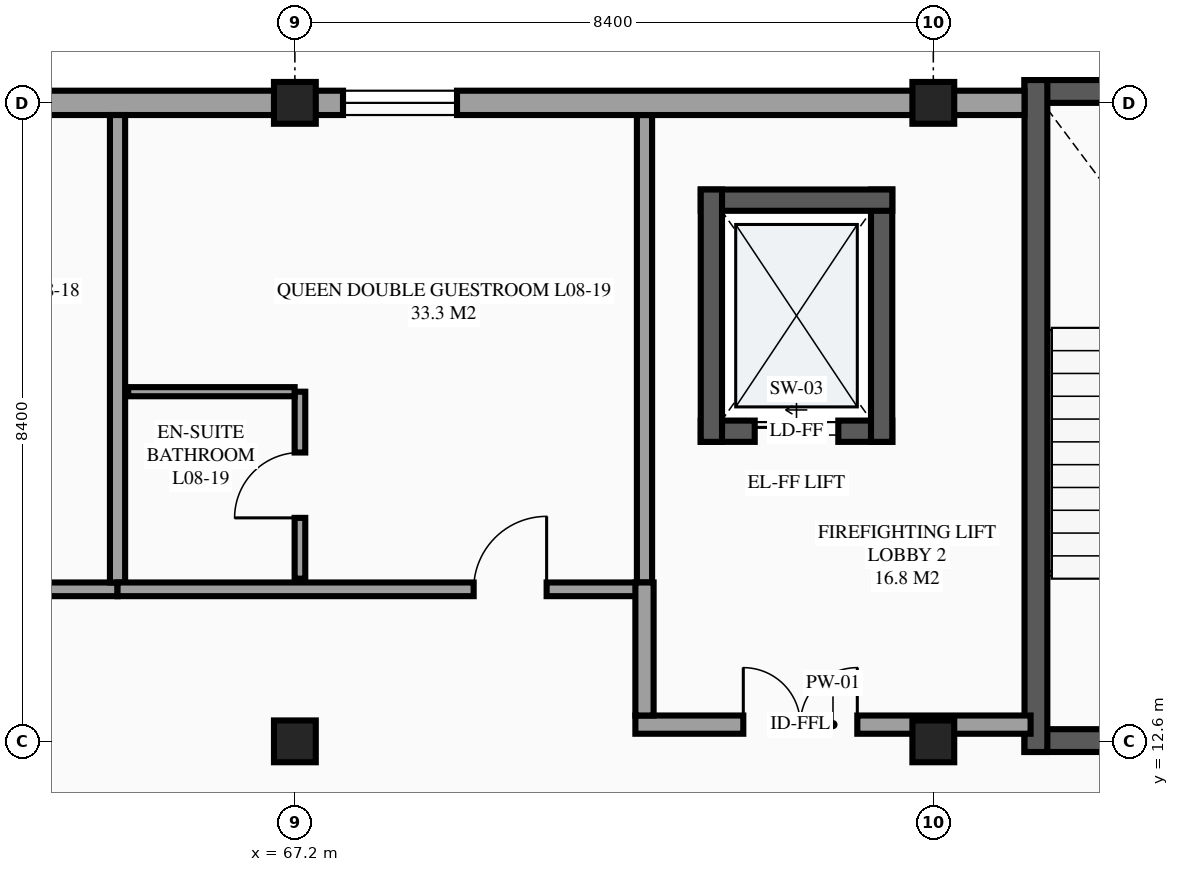
"""IFC4 building model, lengths in metres.
Left out: names, types, materials, properties, quantities, classifications, styles, units other than length and angle.
Written with IfcOpenShell. Run it as: python <this file> out.ifc"""

import sys

from ifc_helpers import new_model, si_unit, direction, frame, frame_2d, origin, origin_2d, place, context, subcontext, project, spatial, rectangle, extrude, element, fill, save


model = new_model("IFC4")
c1 = context("Model", 3, precision=1e-05, world=origin(), true_north=direction((0.0, 1.0)))
c2 = subcontext(c1, "Body", "Model", "MODEL_VIEW")
j1 = project(units=[si_unit("LENGTHUNIT", "METRE"), si_unit("PLANEANGLEUNIT", "RADIAN")], contexts=[c1])
p1 = place(None, origin())
s1 = spatial("IfcSite", under=j1, at=p1, CompositionType="ELEMENT")
p2 = place(p1, origin())
s2 = spatial("IfcBuilding", under=s1, at=p2, CompositionType="ELEMENT")
p3 = place(p2, frame((0.0, 0.0, 32.7)))
s3 = spatial("IfcBuildingStorey", under=s2, at=p3, CompositionType="ELEMENT", Elevation=32.7)
for number, where, z_axis, x_axis in (
    (1, (67.2, 12.6, 0.0), (0.0, 0.0, 1.0), (1.0, 0.0, 0.0)),
    (2, (67.2, 21.0, 0.0), (0.0, 0.0, 1.0), (1.0, 0.0, 0.0)),
    (3, (75.6, 12.6, 0.0), (0.0, 0.0, 1.0), (1.0, 0.0, 0.0)),
    (4, (75.6, 21.0, 0.0), (0.0, 0.0, 1.0), (1.0, 0.0, 0.0)),
):
    element("IfcColumn", number, at=place(p3, frame(where, z_axis=z_axis, x_axis=x_axis)), inside=s3, PredefinedType="COLUMN", context=c2, shape_type="SweptSolid", body=[
        extrude(rectangle(XDim=0.55, YDim=0.55, at=origin_2d()), origin(), (0.0, 0.0, 1.0), 3.6),
    ])
p4 = place(p3, frame((67.2, 21.0, 0.0), z_axis=(0.0, 0.0, 1.0), x_axis=(-1.0, 0.0, 0.0)))
e5 = element("IfcWall", 5, at=p4, inside=s3, PredefinedType="STANDARD", context=c2, shape_type="SweptSolid", body=[
    extrude(rectangle(XDim=8.4, YDim=0.32, at=frame_2d((4.2, 0.0))), origin(), (0.0, 0.0, 1.0), 3.075),
])
p5 = place(p4, frame((5.05, 0.0, 0.85)))
e6 = element("IfcOpeningElement", 6, at=p5, cuts=e5, PredefinedType="OPENING", context=c2, shape_type="SweptSolid", body=[
    extrude(rectangle(XDim=1.5, YDim=1.5, at=frame_2d((0.75, 0.75))), frame((0.0, 0.17, 0.0), z_axis=(0.0, -1.0, 0.0), x_axis=(1.0, 0.0, 0.0)), (0.0, 0.0, 1.0), 0.34),
])
p6 = place(p3, frame((72.54, 16.68, 0.0), z_axis=(0.0, 0.0, 1.0), x_axis=(1.0, 0.0, 0.0)))
e7 = element("IfcWall", 7, at=p6, inside=s3, PredefinedType="SHEAR", context=c2, shape_type="SweptSolid", body=[
    extrude(rectangle(XDim=2.52, YDim=0.28, at=frame_2d((1.26, 0.0))), origin(), (0.0, 0.0, 1.0), 3.6),
])
p7 = place(p6, frame((0.71, 0.0, 0.0)))
e8 = element("IfcOpeningElement", 8, at=p7, cuts=e7, PredefinedType="OPENING", context=c2, shape_type="SweptSolid", body=[
    extrude(rectangle(XDim=1.1, YDim=2.2, at=frame_2d((0.55, 1.1))), frame((0.0, 0.15, 0.0), z_axis=(0.0, -1.0, 0.0), x_axis=(1.0, 0.0, 0.0)), (0.0, 0.0, 1.0), 0.3),
])
p8 = place(p3, frame((74.92, 16.54, 0.0), z_axis=(0.0, 0.0, 1.0), x_axis=(0.0, 1.0, 0.0)))
e9 = element("IfcWall", 9, at=p8, inside=s3, PredefinedType="SHEAR", context=c2, shape_type="SweptSolid", body=[
    extrude(rectangle(XDim=3.32, YDim=0.28, at=frame_2d((1.66, 0.0))), origin(), (0.0, 0.0, 1.0), 3.6),
])
p9 = place(p3, frame((75.06, 19.72, 0.0), z_axis=(0.0, 0.0, 1.0), x_axis=(-1.0, 0.0, 0.0)))
e10 = element("IfcWall", 10, at=p9, inside=s3, PredefinedType="SHEAR", context=c2, shape_type="SweptSolid", body=[
    extrude(rectangle(XDim=2.52, YDim=0.28, at=frame_2d((1.26, 0.0))), origin(), (0.0, 0.0, 1.0), 3.6),
])
p10 = place(p3, frame((72.68, 19.86, 0.0), z_axis=(0.0, 0.0, 1.0), x_axis=(0.0, -1.0, 0.0)))
e11 = element("IfcWall", 11, at=p10, inside=s3, PredefinedType="SHEAR", context=c2, shape_type="SweptSolid", body=[
    extrude(rectangle(XDim=3.32, YDim=0.28, at=frame_2d((1.66, 0.0))), origin(), (0.0, 0.0, 1.0), 3.6),
])
p11 = place(p3, frame((76.8, 12.61, 0.0), z_axis=(0.0, 0.0, 1.0), x_axis=(1.0, 0.0, 0.0)))
e12 = element("IfcWall", 12, at=p11, inside=s3, PredefinedType="SHEAR", context=c2, shape_type="SweptSolid", body=[
    extrude(rectangle(XDim=5.2, YDim=0.3, at=frame_2d((2.6, 0.0))), origin(), (0.0, 0.0, 1.0), 3.6),
])
p12 = place(p11, frame((2.025, 0.0, 0.0)))
e13 = element("IfcOpeningElement", 13, at=p12, cuts=e12, PredefinedType="OPENING", context=c2, shape_type="SweptSolid", body=[
    extrude(rectangle(XDim=1.15, YDim=2.15, at=frame_2d((0.575, 1.075))), frame((0.0, 0.16, 0.0), z_axis=(0.0, -1.0, 0.0), x_axis=(1.0, 0.0, 0.0)), (0.0, 0.0, 1.0), 0.32),
])
p13 = place(p3, frame((82.0, 21.15, 0.0), z_axis=(0.0, 0.0, 1.0), x_axis=(-1.0, 0.0, 0.0)))
e14 = element("IfcWall", 14, at=p13, inside=s3, PredefinedType="SHEAR", context=c2, shape_type="SweptSolid", body=[
    extrude(rectangle(XDim=5.2, YDim=0.3, at=frame_2d((2.6, 0.0))), origin(), (0.0, 0.0, 1.0), 3.6),
])
p14 = place(p3, frame((76.95, 21.3, 0.0), z_axis=(0.0, 0.0, 1.0), x_axis=(0.0, -1.0, 0.0)))
e15 = element("IfcWall", 15, at=p14, inside=s3, PredefinedType="SHEAR", context=c2, shape_type="SweptSolid", body=[
    extrude(rectangle(XDim=8.84, YDim=0.3, at=frame_2d((4.42, 0.0))), origin(), (0.0, 0.0, 1.0), 3.6),
])
p15 = place(p3, frame((57.933, 14.6, 0.0), z_axis=(0.0, 0.0, 1.0), x_axis=(1.0, 0.0, 0.0)))
e16 = element("IfcWall", 16, at=p15, inside=s3, PredefinedType="PARTITIONING", context=c2, shape_type="SweptSolid", body=[
    extrude(rectangle(XDim=6.933, YDim=0.18, at=frame_2d((3.467, 0.0))), origin(), (0.0, 0.0, 1.0), 3.375),
])
p16 = place(p15, frame((4.686, 0.0, 0.0)))
e17 = element("IfcOpeningElement", 17, at=p16, cuts=e16, PredefinedType="OPENING", context=c2, shape_type="SweptSolid", body=[
    extrude(rectangle(XDim=0.96, YDim=2.15, at=frame_2d((0.48, 1.075))), frame((0.0, 0.1, 0.0), z_axis=(0.0, -1.0, 0.0), x_axis=(1.0, 0.0, 0.0)), (0.0, 0.0, 1.0), 0.2),
])
p17 = place(p3, frame((64.867, 14.69, 0.0), z_axis=(0.0, 0.0, 1.0), x_axis=(0.0, 1.0, 0.0)))
e18 = element("IfcWall", 18, at=p17, inside=s3, PredefinedType="PARTITIONING", context=c2, shape_type="SweptSolid", body=[
    extrude(rectangle(XDim=6.15, YDim=0.2, at=frame_2d((3.075, 0.0))), origin(), (0.0, 0.0, 1.0), 3.375),
])
p18 = place(p3, frame((64.867, 14.6, 0.0), z_axis=(0.0, 0.0, 1.0), x_axis=(1.0, 0.0, 0.0)))
e19 = element("IfcWall", 19, at=p18, inside=s3, PredefinedType="PARTITIONING", context=c2, shape_type="SweptSolid", body=[
    extrude(rectangle(XDim=6.933, YDim=0.18, at=frame_2d((3.467, 0.0))), origin(), (0.0, 0.0, 1.0), 3.375),
])
p19 = place(p18, frame((4.686, 0.0, 0.0)))
e20 = element("IfcOpeningElement", 20, at=p19, cuts=e19, PredefinedType="OPENING", context=c2, shape_type="SweptSolid", body=[
    extrude(rectangle(XDim=0.96, YDim=2.15, at=frame_2d((0.48, 1.075))), frame((0.0, 0.1, 0.0), z_axis=(0.0, -1.0, 0.0), x_axis=(1.0, 0.0, 0.0)), (0.0, 0.0, 1.0), 0.2),
])
p20 = place(p3, frame((71.8, 14.69, 0.0), z_axis=(0.0, 0.0, 1.0), x_axis=(0.0, 1.0, 0.0)))
e21 = element("IfcWall", 21, at=p20, inside=s3, PredefinedType="PARTITIONING", context=c2, shape_type="SweptSolid", body=[
    extrude(rectangle(XDim=6.15, YDim=0.2, at=frame_2d((3.075, 0.0))), origin(), (0.0, 0.0, 1.0), 3.375),
])
p21 = place(p3, frame((67.267, 14.74, 0.0), z_axis=(0.0, 0.0, 1.0), x_axis=(0.0, 1.0, 0.0)))
e22 = element("IfcWall", 22, at=p21, inside=s3, PredefinedType="PARTITIONING", context=c2, shape_type="SweptSolid", body=[
    extrude(rectangle(XDim=2.46, YDim=0.14, at=frame_2d((1.23, 0.0))), origin(), (0.0, 0.0, 1.0), 2.43),
])
p22 = place(p21, frame((0.8, 0.0, 0.0)))
e23 = element("IfcOpeningElement", 23, at=p22, cuts=e22, PredefinedType="OPENING", context=c2, shape_type="SweptSolid", body=[
    extrude(rectangle(XDim=0.86, YDim=2.1, at=frame_2d((0.43, 1.05))), frame((0.0, 0.08, 0.0), z_axis=(0.0, -1.0, 0.0), x_axis=(1.0, 0.0, 0.0)), (0.0, 0.0, 1.0), 0.16),
])
p23 = place(p3, frame((65.007, 17.2, 0.0), z_axis=(0.0, 0.0, 1.0), x_axis=(1.0, 0.0, 0.0)))
e24 = element("IfcWall", 24, at=p23, inside=s3, PredefinedType="PARTITIONING", context=c2, shape_type="SweptSolid", body=[
    extrude(rectangle(XDim=2.19, YDim=0.12, at=frame_2d((1.095, 0.0))), origin(), (0.0, 0.0, 1.0), 3.375),
])
p24 = place(p3, frame((71.68, 12.82, 0.0), z_axis=(0.0, 0.0, 1.0), x_axis=(1.0, 0.0, 0.0)))
e25 = element("IfcWall", 25, at=p24, inside=s3, PredefinedType="PARTITIONING", context=c2, shape_type="SweptSolid", body=[
    extrude(rectangle(XDim=5.2, YDim=0.24, at=frame_2d((2.6, 0.0))), origin(), (0.0, 0.0, 1.0), 2.63),
])
p25 = place(p24, frame((1.42, 0.0, 0.0)))
e26 = element("IfcOpeningElement", 26, at=p25, cuts=e25, PredefinedType="OPENING", context=c2, shape_type="SweptSolid", body=[
    extrude(rectangle(XDim=1.5, YDim=2.15, at=frame_2d((0.75, 1.075))), frame((0.0, 0.13, 0.0), z_axis=(0.0, -1.0, 0.0), x_axis=(1.0, 0.0, 0.0)), (0.0, 0.0, 1.0), 0.26),
])
p26 = place(p3, frame((71.8, 12.94, 0.0), z_axis=(0.0, 0.0, 1.0), x_axis=(0.0, 1.0, 0.0)))
e27 = element("IfcWall", 27, at=p26, inside=s3, PredefinedType="PARTITIONING", context=c2, shape_type="SweptSolid", body=[
    extrude(rectangle(XDim=1.75, YDim=0.24, at=frame_2d((0.875, 0.0))), origin(), (0.0, 0.0, 1.0), 3.375),
])
p27 = place(p3, frame((76.8, 21.0, 0.0), z_axis=(0.0, 0.0, 1.0), x_axis=(-1.0, 0.0, 0.0)))
e28 = element("IfcWall", 28, at=p27, inside=s3, PredefinedType="STANDARD", context=c2, shape_type="SweptSolid", body=[
    extrude(rectangle(XDim=1.2, YDim=0.32, at=frame_2d((0.6, 0.0))), origin(), (0.0, 0.0, 1.0), 2.43),
])
p28 = place(p3, frame((75.6, 21.0, 0.0), z_axis=(0.0, 0.0, 1.0), x_axis=(-1.0, 0.0, 0.0)))
e29 = element("IfcWall", 29, at=p28, inside=s3, PredefinedType="STANDARD", context=c2, shape_type="SweptSolid", body=[
    extrude(rectangle(XDim=8.4, YDim=0.32, at=frame_2d((4.2, 0.0))), origin(), (0.0, 0.0, 1.0), 2.78),
])
p29 = place(p28, frame((6.267, 0.0, 0.85)))
e30 = element("IfcOpeningElement", 30, at=p29, cuts=e29, PredefinedType="OPENING", context=c2, shape_type="SweptSolid", body=[
    extrude(rectangle(XDim=1.5, YDim=1.5, at=frame_2d((0.75, 0.75))), frame((0.0, 0.17, 0.0), z_axis=(0.0, -1.0, 0.0), x_axis=(1.0, 0.0, 0.0)), (0.0, 0.0, 1.0), 0.34),
])
p30 = place(p29, origin())
e31 = element("IfcWindow", 31, at=p30, inside=s3, PartitioningType="SINGLE_PANEL", PredefinedType="WINDOW", context=c2, shape_type="SweptSolid", body=[
    extrude(rectangle(XDim=1.5, YDim=1.5, at=frame_2d((0.75, 0.75))), frame((0.0, 0.03, 0.0), z_axis=(0.0, -1.0, 0.0), x_axis=(1.0, 0.0, 0.0)), (0.0, 0.0, 1.0), 0.06),
])
fill(e30, e31)
p31 = place(p7, origin())
e32 = element("IfcDoor", 32, at=p31, inside=s3, OperationType="SLIDING_TO_LEFT", PredefinedType="DOOR", context=c2, shape_type="SweptSolid", body=[
    extrude(rectangle(XDim=1.1, YDim=2.2, at=frame_2d((0.55, 1.1))), frame((0.0, 0.025, 0.0), z_axis=(0.0, -1.0, 0.0), x_axis=(1.0, 0.0, 0.0)), (0.0, 0.0, 1.0), 0.05),
])
fill(e8, e32)
p32 = place(p19, origin())
e33 = element("IfcDoor", 33, at=p32, inside=s3, OperationType="SINGLE_SWING_RIGHT", PredefinedType="DOOR", context=c2, shape_type="SweptSolid", body=[
    extrude(rectangle(XDim=0.96, YDim=2.15, at=frame_2d((0.48, 1.075))), frame((0.0, 0.025, 0.0), z_axis=(0.0, -1.0, 0.0), x_axis=(1.0, 0.0, 0.0)), (0.0, 0.0, 1.0), 0.05),
])
fill(e20, e33)
p33 = place(p22, origin())
e34 = element("IfcDoor", 34, at=p33, inside=s3, OperationType="SINGLE_SWING_LEFT", PredefinedType="DOOR", context=c2, shape_type="SweptSolid", body=[
    extrude(rectangle(XDim=0.86, YDim=2.1, at=frame_2d((0.43, 1.05))), frame((0.0, 0.025, 0.0), z_axis=(0.0, -1.0, 0.0), x_axis=(1.0, 0.0, 0.0)), (0.0, 0.0, 1.0), 0.05),
])
fill(e23, e34)
p34 = place(p25, origin())
e35 = element("IfcDoor", 35, at=p34, inside=s3, OperationType="DOUBLE_DOOR_SINGLE_SWING", PredefinedType="DOOR", context=c2, shape_type="SweptSolid", body=[
    extrude(rectangle(XDim=1.5, YDim=2.15, at=frame_2d((0.75, 1.075))), frame((0.0, 0.025, 0.0), z_axis=(0.0, -1.0, 0.0), x_axis=(1.0, 0.0, 0.0)), (0.0, 0.0, 1.0), 0.05),
])
fill(e26, e35)
save(model, sys.argv[1])
